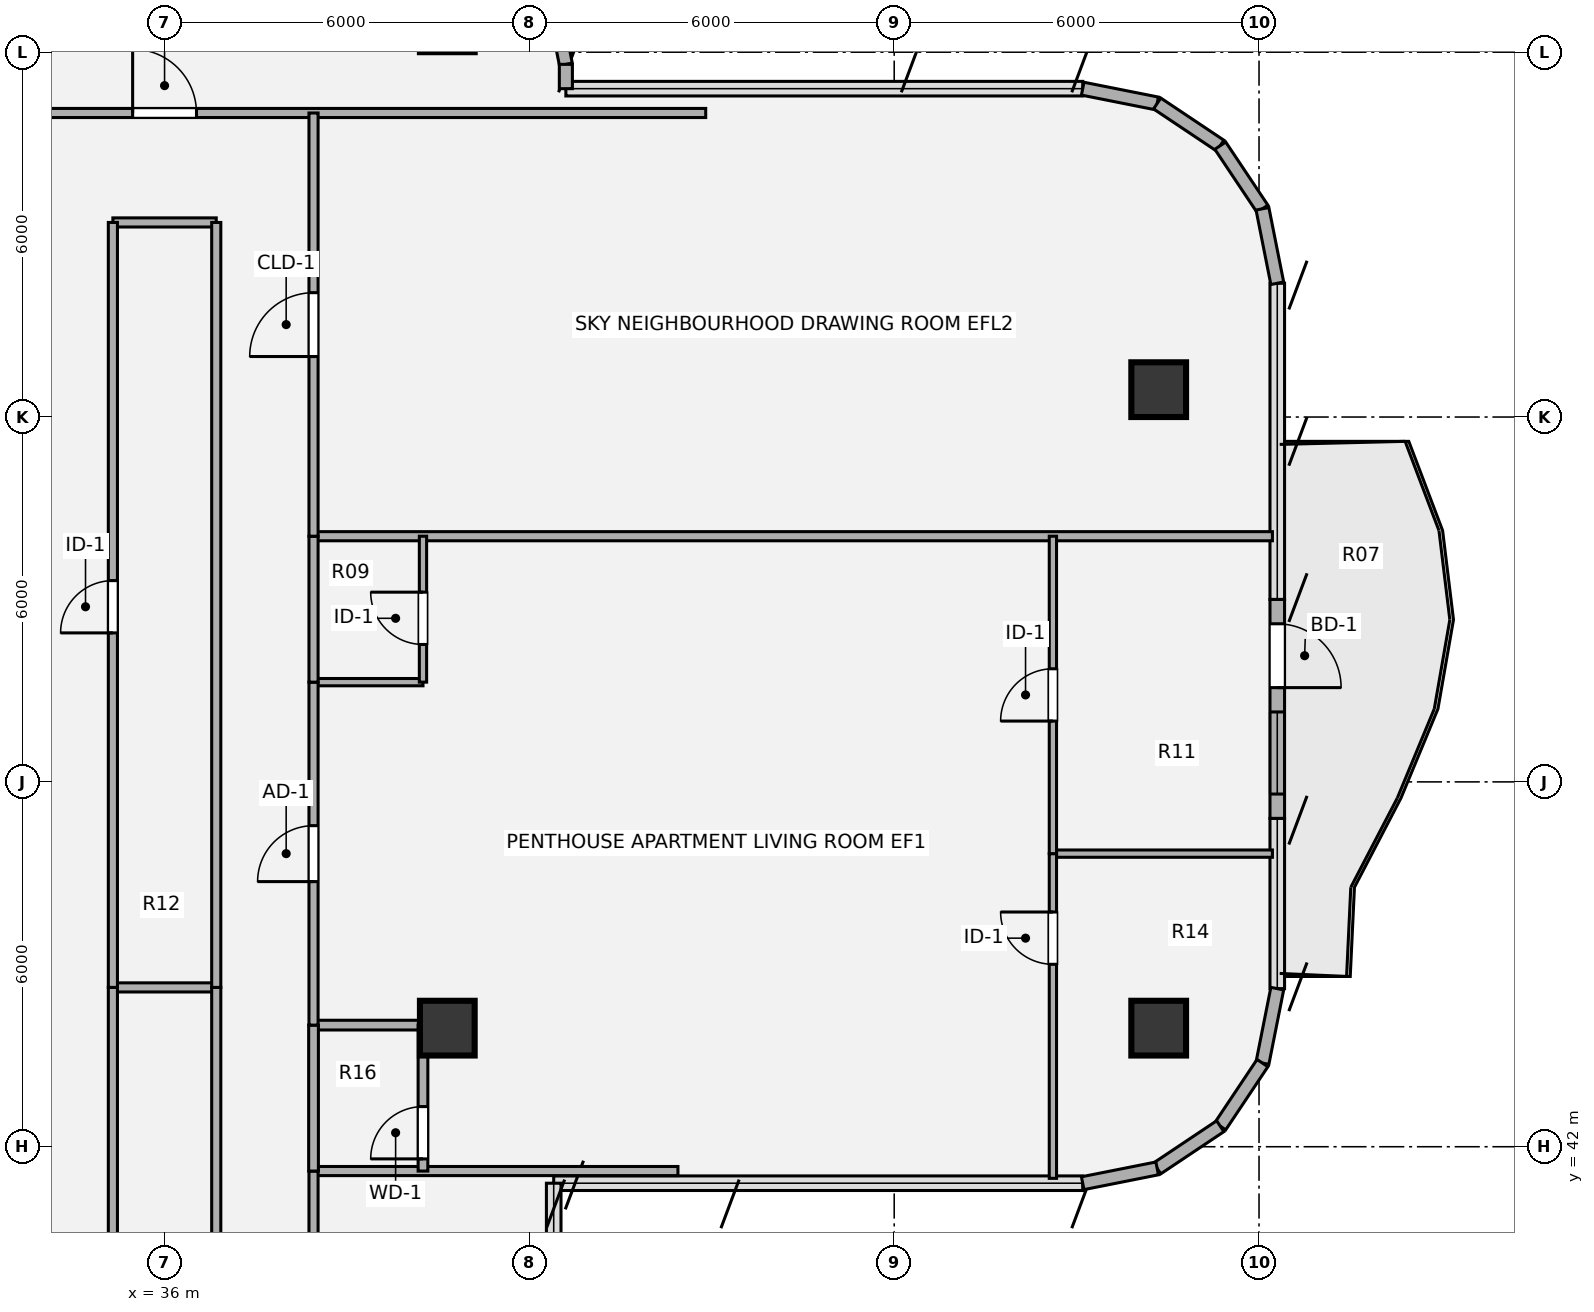
"""IFC4 building model, lengths in metres.
Left out: names, types, materials, properties, quantities, classifications, styles, units other than length and angle.
Written with IfcOpenShell. Run it as: python <this file> out.ifc"""

import sys

from ifc_helpers import new_model, si_unit, direction, frame, frame_2d, origin, origin_2d, place, context, subcontext, project, spatial, rectangle, hollow_circle, extrude, source, transform, mapped, element, fill, save


model = new_model("IFC4")
c1 = context("Model", 3, precision=1e-05, world=origin(), true_north=direction((0.0, 1.0)))
c2 = subcontext(c1, "Body", "Model", "MODEL_VIEW")
j1 = project(units=[si_unit("LENGTHUNIT", "METRE"), si_unit("PLANEANGLEUNIT", "RADIAN")], contexts=[c1])
p1 = place(None, origin())
s1 = spatial("IfcSite", under=j1, at=p1, CompositionType="ELEMENT")
p2 = place(p1, origin())
s2 = spatial("IfcBuilding", under=s1, at=p2, CompositionType="ELEMENT")
p3 = place(p2, frame((0.0, 0.0, 275.94)))
s3 = spatial("IfcBuildingStorey", under=s2, at=p3, CompositionType="ELEMENT", Elevation=275.94)
m1 = source(origin(), c2, "Body", "SweptSolid", [
    extrude(hollow_circle(Radius=0.45, WallThickness=0.032, at=origin_2d()), origin(), (0.0, 0.0, 1.0), 3.78),
])
for number, where, z_axis, x_axis in (
    (1, (52.35, 43.95, 0.0), (0.0, 0.0, 1.0), (1.0, 0.0, 0.0)),
    (2, (52.35, 54.45, 0.0), (0.0, 0.0, 1.0), (1.0, 0.0, 0.0)),
    (3, (40.65, 43.95, 0.0), (0.0, 0.0, 1.0), (1.0, 0.0, 0.0)),
):
    element("IfcColumn", number, at=place(p3, frame(where, z_axis=z_axis, x_axis=x_axis)), inside=s3, PredefinedType="COLUMN", context=c2, shape_type="MappedRepresentation", body=[
        mapped(m1, transform((0.0, 0.0, 0.0), x_axis=(1.0, 0.0, 0.0), y_axis=(0.0, 1.0, 0.0), z_axis=(0.0, 0.0, 1.0), scale=1.0)),
    ])
p4 = place(p3, frame((42.402, 60.795, 0.0), z_axis=(0.0, 0.0, 1.0), x_axis=(0.195190360752, -0.980765376158, 0.0)))
e4 = element("IfcWall", 4, at=p4, inside=s3, PredefinedType="SOLIDWALL", context=c2, shape_type="SweptSolid", body=[
    extrude(rectangle(XDim=1.014, YDim=0.215, at=frame_2d((0.507, 0.0))), origin(), (0.0, 0.0, 1.0), 3.53),
])
p5 = place(p3, frame((42.6, 59.8, 0.0), z_axis=(0.0, 0.0, 1.0), x_axis=(0.0, -1.0, 0.0)))
e5 = element("IfcWall", 5, at=p5, inside=s3, PredefinedType="SOLIDWALL", context=c2, shape_type="SweptSolid", body=[
    extrude(rectangle(XDim=0.4, YDim=0.215, at=frame_2d((0.2, 0.0))), origin(), (0.0, 0.0, 1.0), 3.53),
])
for number, where, z_axis, x_axis in (
    (6, (51.1, 59.4, 0.0), (0.0, 0.0, 1.0), (0.981, -0.195, 0.0)),
    (7, (52.325, 59.156, 0.0), (0.0, 0.0, 1.0), (0.831, -0.556, 0.0)),
    (8, (53.363, 58.463, 0.0), (0.0, 0.0, 1.0), (0.556, -0.831, 0.0)),
    (9, (54.056, 57.425, 0.0), (0.0, 0.0, 1.0), (0.195, -0.981, 0.0)),
):
    element("IfcWall", number, at=place(p3, frame(where, z_axis=z_axis, x_axis=x_axis)), inside=s3, PredefinedType="SOLIDWALL", context=c2, shape_type="SweptSolid", body=[
        extrude(rectangle(XDim=1.249, YDim=0.215, at=frame_2d((0.624, 0.0))), origin(), (0.0, 0.0, 1.0), 3.53),
    ])
p6 = place(p3, frame((54.3, 51.0, 0.0), z_axis=(0.0, 0.0, 1.0), x_axis=(0.0, -1.0, 0.0)))
e10 = element("IfcWall", 10, at=p6, inside=s3, PredefinedType="SOLIDWALL", context=c2, shape_type="SweptSolid", body=[
    extrude(rectangle(XDim=3.6, YDim=0.24, at=frame_2d((1.8, 0.0))), origin(), (0.0, 0.0, 1.0), 3.53),
])
p7 = place(p6, frame((0.4, 0.0, 0.0)))
e11 = element("IfcOpeningElement", 11, at=p7, cuts=e10, PredefinedType="OPENING", context=c2, shape_type="SweptSolid", body=[
    extrude(rectangle(XDim=1.05, YDim=2.15, at=origin_2d()), frame((0.525, 0.13, 1.075), z_axis=(0.0, -1.0, 0.0), x_axis=(1.0, 0.0, 0.0)), (0.0, 0.0, 1.0), 0.26),
])
p8 = place(p6, frame((1.85, 0.0, 0.85)))
e12 = element("IfcOpeningElement", 12, at=p8, cuts=e10, PredefinedType="OPENING", context=c2, shape_type="SweptSolid", body=[
    extrude(rectangle(XDim=1.35, YDim=1.35, at=origin_2d()), frame((0.675, 0.13, 0.675), z_axis=(0.0, -1.0, 0.0), x_axis=(1.0, 0.0, 0.0)), (0.0, 0.0, 1.0), 0.26),
])
for number, where, z_axis, x_axis in (
    (13, (54.3, 44.6, 0.0), (0.0, 0.0, 1.0), (-0.195, -0.981, 0.0)),
    (14, (54.056, 43.375, 0.0), (0.0, 0.0, 1.0), (-0.556, -0.831, 0.0)),
    (15, (53.363, 42.337, 0.0), (0.0, 0.0, 1.0), (-0.831, -0.556, 0.0)),
    (16, (52.325, 41.644, 0.0), (0.0, 0.0, 1.0), (-0.981, -0.195, 0.0)),
):
    element("IfcWall", number, at=place(p3, frame(where, z_axis=z_axis, x_axis=x_axis)), inside=s3, PredefinedType="SOLIDWALL", context=c2, shape_type="SweptSolid", body=[
        extrude(rectangle(XDim=1.249, YDim=0.215, at=frame_2d((0.624, 0.0))), origin(), (0.0, 0.0, 1.0), 3.53),
    ])
p9 = place(p3, frame((38.45, 41.6, 0.0), z_axis=(0.0, 0.0, 1.0), x_axis=(1.0, 0.0, 0.0)))
e17 = element("IfcWall", 17, at=p9, inside=s3, PredefinedType="PARTITIONING", context=c2, shape_type="SweptSolid", body=[
    extrude(rectangle(XDim=5.993, YDim=0.15, at=frame_2d((2.997, 0.0))), origin(), (0.0, 0.0, 1.0), 3.5),
])
p10 = place(p3, frame((38.45, 44.0, 0.0), z_axis=(0.0, 0.0, 1.0), x_axis=(1.0, 0.0, 0.0)))
e18 = element("IfcWall", 18, at=p10, inside=s3, PredefinedType="PLUMBINGWALL", context=c2, shape_type="SweptSolid", body=[
    extrude(rectangle(XDim=1.8, YDim=0.16, at=frame_2d((0.9, 0.0))), origin(), (0.0, 0.0, 1.0), 2.903),
])
p11 = place(p3, frame((35.15, 44.62, 0.0), z_axis=(0.0, 0.0, 1.0), x_axis=(1.0, 0.0, 0.0)))
e19 = element("IfcWall", 19, at=p11, inside=s3, PredefinedType="PARTITIONING", context=c2, shape_type="SweptSolid", body=[
    extrude(rectangle(XDim=1.7, YDim=0.15, at=frame_2d((0.85, 0.0))), origin(), (0.0, 0.0, 1.0), 3.259),
])
p12 = place(p3, frame((50.61, 46.82, 0.0), z_axis=(0.0, 0.0, 1.0), x_axis=(1.0, 0.0, 0.0)))
e20 = element("IfcWall", 20, at=p12, inside=s3, PredefinedType="PARTITIONING", context=c2, shape_type="SweptSolid", body=[
    extrude(rectangle(XDim=3.61, YDim=0.12, at=frame_2d((1.805, 0.0))), origin(), (0.0, 0.0, 1.0), 2.982),
])
p13 = place(p3, frame((38.45, 49.64, 0.0), z_axis=(0.0, 0.0, 1.0), x_axis=(1.0, 0.0, 0.0)))
e21 = element("IfcWall", 21, at=p13, inside=s3, PredefinedType="PARTITIONING", context=c2, shape_type="SweptSolid", body=[
    extrude(rectangle(XDim=1.8, YDim=0.12, at=frame_2d((0.9, 0.0))), origin(), (0.0, 0.0, 1.0), 3.259),
])
p14 = place(p3, frame((38.45, 52.04, 0.0), z_axis=(0.0, 0.0, 1.0), x_axis=(1.0, 0.0, 0.0)))
e22 = element("IfcWall", 22, at=p14, inside=s3, PredefinedType="PARTITIONING", context=c2, shape_type="SweptSolid", body=[
    extrude(rectangle(XDim=15.77, YDim=0.15, at=frame_2d((7.885, 0.0))), origin(), (0.0, 0.0, 1.0), 2.982),
])
p15 = place(p3, frame((35.15, 57.2, 0.0), z_axis=(0.0, 0.0, 1.0), x_axis=(1.0, 0.0, 0.0)))
e23 = element("IfcWall", 23, at=p15, inside=s3, PredefinedType="PARTITIONING", context=c2, shape_type="SweptSolid", body=[
    extrude(rectangle(XDim=1.7, YDim=0.15, at=frame_2d((0.85, 0.0))), origin(), (0.0, 0.0, 1.0), 3.308),
])
p16 = place(p3, frame((27.1, 59.0, 0.0), z_axis=(0.0, 0.0, 1.0), x_axis=(1.0, 0.0, 0.0)))
e24 = element("IfcWall", 24, at=p16, inside=s3, PredefinedType="PARTITIONING", context=c2, shape_type="SweptSolid", body=[
    extrude(rectangle(XDim=17.8, YDim=0.15, at=frame_2d((8.9, 0.0))), origin(), (0.0, 0.0, 1.0), 3.308),
])
p17 = place(p16, frame((8.375, 0.0, 0.0)))
e25 = element("IfcOpeningElement", 25, at=p17, cuts=e24, PredefinedType="OPENING", context=c2, shape_type="SweptSolid", body=[
    extrude(rectangle(XDim=1.05, YDim=2.1, at=origin_2d()), frame((0.525, 0.085, 1.05), z_axis=(0.0, -1.0, 0.0), x_axis=(1.0, 0.0, 0.0)), (0.0, 0.0, 1.0), 0.17),
])
p18 = place(p3, frame((35.15, 25.2, 0.0), z_axis=(0.0, 0.0, 1.0), x_axis=(0.0, 1.0, 0.0)))
e26 = element("IfcWall", 26, at=p18, inside=s3, PredefinedType="PARTITIONING", context=c2, shape_type="SweptSolid", body=[
    extrude(rectangle(XDim=19.42, YDim=0.15, at=frame_2d((9.71, 0.0))), origin(), (0.0, 0.0, 1.0), 3.5),
])
p19 = place(p3, frame((35.15, 44.62, 0.0), z_axis=(0.0, 0.0, 1.0), x_axis=(0.0, 1.0, 0.0)))
e27 = element("IfcWall", 27, at=p19, inside=s3, PredefinedType="PARTITIONING", context=c2, shape_type="SweptSolid", body=[
    extrude(rectangle(XDim=12.58, YDim=0.15, at=frame_2d((6.29, 0.0))), origin(), (0.0, 0.0, 1.0), 3.5),
])
p20 = place(p19, frame((5.83, 0.0, 0.0)))
e28 = element("IfcOpeningElement", 28, at=p20, cuts=e27, PredefinedType="OPENING", context=c2, shape_type="SweptSolid", body=[
    extrude(rectangle(XDim=0.86, YDim=2.1, at=origin_2d()), frame((0.43, 0.085, 1.05), z_axis=(0.0, -1.0, 0.0), x_axis=(1.0, 0.0, 0.0)), (0.0, 0.0, 1.0), 0.17),
])
p21 = place(p3, frame((36.85, 25.2, 0.0), z_axis=(0.0, 0.0, 1.0), x_axis=(0.0, 1.0, 0.0)))
e29 = element("IfcWall", 29, at=p21, inside=s3, PredefinedType="PARTITIONING", context=c2, shape_type="SweptSolid", body=[
    extrude(rectangle(XDim=19.42, YDim=0.15, at=frame_2d((9.71, 0.0))), origin(), (0.0, 0.0, 1.0), 3.5),
])
p22 = place(p21, frame((9.185, 0.0, 0.0)))
e30 = element("IfcOpeningElement", 30, at=p22, cuts=e29, PredefinedType="OPENING", context=c2, shape_type="SweptSolid", body=[
    extrude(rectangle(XDim=1.05, YDim=2.1, at=origin_2d()), frame((0.525, 0.085, 1.05), z_axis=(0.0, -1.0, 0.0), x_axis=(1.0, 0.0, 0.0)), (0.0, 0.0, 1.0), 0.17),
])
p23 = place(p3, frame((36.85, 44.62, 0.0), z_axis=(0.0, 0.0, 1.0), x_axis=(0.0, 1.0, 0.0)))
e31 = element("IfcWall", 31, at=p23, inside=s3, PredefinedType="PARTITIONING", context=c2, shape_type="SweptSolid", body=[
    extrude(rectangle(XDim=12.58, YDim=0.15, at=frame_2d((6.29, 0.0))), origin(), (0.0, 0.0, 1.0), 3.5),
])
p24 = place(p3, frame((38.45, 21.2, 0.0), z_axis=(0.0, 0.0, 1.0), x_axis=(0.0, 1.0, 0.0)))
e32 = element("IfcWall", 32, at=p24, inside=s3, PredefinedType="PARTITIONING", context=c2, shape_type="SweptSolid", body=[
    extrude(rectangle(XDim=20.4, YDim=0.15, at=frame_2d((10.2, 0.0))), origin(), (0.0, 0.0, 1.0), 3.5),
])
p25 = place(p24, frame((9.575, 0.0, 0.0)))
e33 = element("IfcOpeningElement", 33, at=p25, cuts=e32, PredefinedType="OPENING", context=c2, shape_type="SweptSolid", body=[
    extrude(rectangle(XDim=1.05, YDim=2.1, at=origin_2d()), frame((0.525, 0.085, 1.05), z_axis=(0.0, -1.0, 0.0), x_axis=(1.0, 0.0, 0.0)), (0.0, 0.0, 1.0), 0.17),
])
p26 = place(p3, frame((38.45, 41.6, 0.0), z_axis=(0.0, 0.0, 1.0), x_axis=(0.0, 1.0, 0.0)))
e34 = element("IfcWall", 34, at=p26, inside=s3, PredefinedType="PLUMBINGWALL", context=c2, shape_type="SweptSolid", body=[
    extrude(rectangle(XDim=2.4, YDim=0.16, at=frame_2d((1.2, 0.0))), origin(), (0.0, 0.0, 1.0), 3.5),
])
p27 = place(p3, frame((38.45, 44.0, 0.0), z_axis=(0.0, 0.0, 1.0), x_axis=(0.0, 1.0, 0.0)))
e35 = element("IfcWall", 35, at=p27, inside=s3, PredefinedType="PARTITIONING", context=c2, shape_type="SweptSolid", body=[
    extrude(rectangle(XDim=5.64, YDim=0.15, at=frame_2d((2.82, 0.0))), origin(), (0.0, 0.0, 1.0), 3.5),
])
p28 = place(p27, frame((2.36, 0.0, 0.0)))
e36 = element("IfcOpeningElement", 36, at=p28, cuts=e35, PredefinedType="OPENING", context=c2, shape_type="SweptSolid", body=[
    extrude(rectangle(XDim=0.92, YDim=2.1, at=origin_2d()), frame((0.46, 0.085, 1.05), z_axis=(0.0, -1.0, 0.0), x_axis=(1.0, 0.0, 0.0)), (0.0, 0.0, 1.0), 0.17),
])
p29 = place(p3, frame((38.45, 49.64, 0.0), z_axis=(0.0, 0.0, 1.0), x_axis=(0.0, 1.0, 0.0)))
e37 = element("IfcWall", 37, at=p29, inside=s3, PredefinedType="PARTITIONING", context=c2, shape_type="SweptSolid", body=[
    extrude(rectangle(XDim=2.4, YDim=0.15, at=frame_2d((1.2, 0.0))), origin(), (0.0, 0.0, 1.0), 3.5),
])
p30 = place(p3, frame((38.45, 52.04, 0.0), z_axis=(0.0, 0.0, 1.0), x_axis=(0.0, 1.0, 0.0)))
e38 = element("IfcWall", 38, at=p30, inside=s3, PredefinedType="PARTITIONING", context=c2, shape_type="SweptSolid", body=[
    extrude(rectangle(XDim=6.96, YDim=0.15, at=frame_2d((3.48, 0.0))), origin(), (0.0, 0.0, 1.0), 3.5),
])
p31 = place(p30, frame((2.955, 0.0, 0.0)))
e39 = element("IfcOpeningElement", 39, at=p31, cuts=e38, PredefinedType="OPENING", context=c2, shape_type="SweptSolid", body=[
    extrude(rectangle(XDim=1.05, YDim=2.1, at=origin_2d()), frame((0.525, 0.085, 1.05), z_axis=(0.0, -1.0, 0.0), x_axis=(1.0, 0.0, 0.0)), (0.0, 0.0, 1.0), 0.17),
])
p32 = place(p3, frame((40.25, 41.6, 0.0), z_axis=(0.0, 0.0, 1.0), x_axis=(0.0, 1.0, 0.0)))
e40 = element("IfcWall", 40, at=p32, inside=s3, PredefinedType="PLUMBINGWALL", context=c2, shape_type="SweptSolid", body=[
    extrude(rectangle(XDim=2.4, YDim=0.16, at=frame_2d((1.2, 0.0))), origin(), (0.0, 0.0, 1.0), 3.5),
])
p33 = place(p32, frame((0.2, 0.0, 0.0)))
e41 = element("IfcOpeningElement", 41, at=p33, cuts=e40, PredefinedType="OPENING", context=c2, shape_type="SweptSolid", body=[
    extrude(rectangle(XDim=0.86, YDim=2.1, at=origin_2d()), frame((0.43, 0.09, 1.05), z_axis=(0.0, -1.0, 0.0), x_axis=(1.0, 0.0, 0.0)), (0.0, 0.0, 1.0), 0.18),
])
p34 = place(p3, frame((40.25, 49.64, 0.0), z_axis=(0.0, 0.0, 1.0), x_axis=(0.0, 1.0, 0.0)))
e42 = element("IfcWall", 42, at=p34, inside=s3, PredefinedType="PARTITIONING", context=c2, shape_type="SweptSolid", body=[
    extrude(rectangle(XDim=2.4, YDim=0.12, at=frame_2d((1.2, 0.0))), origin(), (0.0, 0.0, 1.0), 3.5),
])
p35 = place(p34, frame((0.62, 0.0, 0.0)))
e43 = element("IfcOpeningElement", 43, at=p35, cuts=e42, PredefinedType="OPENING", context=c2, shape_type="SweptSolid", body=[
    extrude(rectangle(XDim=0.86, YDim=2.1, at=origin_2d()), frame((0.43, 0.07, 1.05), z_axis=(0.0, -1.0, 0.0), x_axis=(1.0, 0.0, 0.0)), (0.0, 0.0, 1.0), 0.14),
])
p36 = place(p3, frame((50.61, 41.48, 0.0), z_axis=(0.0, 0.0, 1.0), x_axis=(0.0, 1.0, 0.0)))
e44 = element("IfcWall", 44, at=p36, inside=s3, PredefinedType="PARTITIONING", context=c2, shape_type="SweptSolid", body=[
    extrude(rectangle(XDim=5.34, YDim=0.12, at=frame_2d((2.67, 0.0))), origin(), (0.0, 0.0, 1.0), 3.5),
])
p37 = place(p36, frame((3.52, 0.0, 0.0)))
e45 = element("IfcOpeningElement", 45, at=p37, cuts=e44, PredefinedType="OPENING", context=c2, shape_type="SweptSolid", body=[
    extrude(rectangle(XDim=0.86, YDim=2.1, at=origin_2d()), frame((0.43, 0.07, 1.05), z_axis=(0.0, -1.0, 0.0), x_axis=(1.0, 0.0, 0.0)), (0.0, 0.0, 1.0), 0.14),
])
p38 = place(p3, frame((50.61, 46.82, 0.0), z_axis=(0.0, 0.0, 1.0), x_axis=(0.0, 1.0, 0.0)))
e46 = element("IfcWall", 46, at=p38, inside=s3, PredefinedType="PARTITIONING", context=c2, shape_type="SweptSolid", body=[
    extrude(rectangle(XDim=5.22, YDim=0.12, at=frame_2d((2.61, 0.0))), origin(), (0.0, 0.0, 1.0), 3.5),
])
p39 = place(p38, frame((2.18, 0.0, 0.0)))
e47 = element("IfcOpeningElement", 47, at=p39, cuts=e46, PredefinedType="OPENING", context=c2, shape_type="SweptSolid", body=[
    extrude(rectangle(XDim=0.86, YDim=2.1, at=origin_2d()), frame((0.43, 0.07, 1.05), z_axis=(0.0, -1.0, 0.0), x_axis=(1.0, 0.0, 0.0)), (0.0, 0.0, 1.0), 0.14),
])
m2 = source(origin(), c2, "Body", "SweptSolid", [
    extrude(rectangle(XDim=1.05, YDim=2.15, at=origin_2d()), frame((0.525, 0.025, 1.075), z_axis=(0.0, -1.0, 0.0), x_axis=(1.0, 0.0, 0.0)), (0.0, 0.0, 1.0), 0.05),
])
p40 = place(p7, origin())
e48 = element("IfcDoor", 48, at=p40, inside=s3, OperationType="SINGLE_SWING_RIGHT", PredefinedType="DOOR", context=c2, shape_type="MappedRepresentation", body=[
    mapped(m2, transform((0.0, 0.0, 0.0), x_axis=(1.0, 0.0, 0.0), y_axis=(0.0, 1.0, 0.0), z_axis=(0.0, 0.0, 1.0), scale=1.0)),
])
fill(e11, e48)
m3 = source(origin(), c2, "Body", "SweptSolid", [
    extrude(rectangle(XDim=1.35, YDim=1.35, at=origin_2d()), frame((0.675, 0.03, 0.675), z_axis=(0.0, -1.0, 0.0), x_axis=(1.0, 0.0, 0.0)), (0.0, 0.0, 1.0), 0.06),
])
p41 = place(p8, origin())
e49 = element("IfcWindow", 49, at=p41, inside=s3, PartitioningType="SINGLE_PANEL", PredefinedType="WINDOW", context=c2, shape_type="MappedRepresentation", body=[
    mapped(m3, transform((0.0, 0.0, 0.0), x_axis=(1.0, 0.0, 0.0), y_axis=(0.0, 1.0, 0.0), z_axis=(0.0, 0.0, 1.0), scale=1.0)),
])
fill(e12, e49)
m4 = source(origin(), c2, "Body", "SweptSolid", [
    extrude(rectangle(XDim=1.05, YDim=2.1, at=origin_2d()), frame((0.525, 0.025, 1.05), z_axis=(0.0, -1.0, 0.0), x_axis=(1.0, 0.0, 0.0)), (0.0, 0.0, 1.0), 0.05),
])
p42 = place(p17, origin())
e50 = element("IfcDoor", 50, at=p42, inside=s3, OperationType="SINGLE_SWING_LEFT", PredefinedType="DOOR", context=c2, shape_type="MappedRepresentation", body=[
    mapped(m4, transform((0.0, 0.0, 0.0), x_axis=(1.0, 0.0, 0.0), y_axis=(0.0, 1.0, 0.0), z_axis=(0.0, 0.0, 1.0), scale=1.0)),
])
fill(e25, e50)
m5 = source(origin(), c2, "Body", "SweptSolid", [
    extrude(rectangle(XDim=0.86, YDim=2.1, at=origin_2d()), frame((0.43, 0.025, 1.05), z_axis=(0.0, -1.0, 0.0), x_axis=(1.0, 0.0, 0.0)), (0.0, 0.0, 1.0), 0.05),
])
p43 = place(p20, origin())
e51 = element("IfcDoor", 51, at=p43, inside=s3, OperationType="SINGLE_SWING_LEFT", PredefinedType="DOOR", context=c2, shape_type="MappedRepresentation", body=[
    mapped(m5, transform((0.0, 0.0, 0.0), x_axis=(1.0, 0.0, 0.0), y_axis=(0.0, 1.0, 0.0), z_axis=(0.0, 0.0, 1.0), scale=1.0)),
])
fill(e28, e51)
m6 = source(origin(), c2, "Body", "SweptSolid", [
    extrude(rectangle(XDim=0.92, YDim=2.1, at=origin_2d()), frame((0.46, 0.025, 1.05), z_axis=(0.0, -1.0, 0.0), x_axis=(1.0, 0.0, 0.0)), (0.0, 0.0, 1.0), 0.05),
])
p44 = place(p28, origin())
e52 = element("IfcDoor", 52, at=p44, inside=s3, OperationType="SINGLE_SWING_LEFT", PredefinedType="DOOR", context=c2, shape_type="MappedRepresentation", body=[
    mapped(m6, transform((0.0, 0.0, 0.0), x_axis=(1.0, 0.0, 0.0), y_axis=(0.0, 1.0, 0.0), z_axis=(0.0, 0.0, 1.0), scale=1.0)),
])
fill(e36, e52)
p45 = place(p31, origin())
e53 = element("IfcDoor", 53, at=p45, inside=s3, OperationType="SINGLE_SWING_LEFT", PredefinedType="DOOR", context=c2, shape_type="MappedRepresentation", body=[
    mapped(m4, transform((0.0, 0.0, 0.0), x_axis=(1.0, 0.0, 0.0), y_axis=(0.0, 1.0, 0.0), z_axis=(0.0, 0.0, 1.0), scale=1.0)),
])
fill(e39, e53)
m7 = source(origin(), c2, "Body", "SweptSolid", [
    extrude(rectangle(XDim=0.86, YDim=2.1, at=origin_2d()), frame((0.43, 0.025, 1.05), z_axis=(0.0, -1.0, 0.0), x_axis=(1.0, 0.0, 0.0)), (0.0, 0.0, 1.0), 0.05),
])
p46 = place(p33, origin())
e54 = element("IfcDoor", 54, at=p46, inside=s3, OperationType="SINGLE_SWING_LEFT", PredefinedType="DOOR", context=c2, shape_type="MappedRepresentation", body=[
    mapped(m7, transform((0.0, 0.0, 0.0), x_axis=(1.0, 0.0, 0.0), y_axis=(0.0, 1.0, 0.0), z_axis=(0.0, 0.0, 1.0), scale=1.0)),
])
fill(e41, e54)
p47 = place(p35, origin())
e55 = element("IfcDoor", 55, at=p47, inside=s3, OperationType="SINGLE_SWING_RIGHT", PredefinedType="DOOR", context=c2, shape_type="MappedRepresentation", body=[
    mapped(m5, transform((0.0, 0.0, 0.0), x_axis=(1.0, 0.0, 0.0), y_axis=(0.0, 1.0, 0.0), z_axis=(0.0, 0.0, 1.0), scale=1.0)),
])
fill(e43, e55)
p48 = place(p37, origin())
e56 = element("IfcDoor", 56, at=p48, inside=s3, OperationType="SINGLE_SWING_RIGHT", PredefinedType="DOOR", context=c2, shape_type="MappedRepresentation", body=[
    mapped(m5, transform((0.0, 0.0, 0.0), x_axis=(1.0, 0.0, 0.0), y_axis=(0.0, 1.0, 0.0), z_axis=(0.0, 0.0, 1.0), scale=1.0)),
])
fill(e45, e56)
p49 = place(p39, origin())
e57 = element("IfcDoor", 57, at=p49, inside=s3, OperationType="SINGLE_SWING_LEFT", PredefinedType="DOOR", context=c2, shape_type="MappedRepresentation", body=[
    mapped(m5, transform((0.0, 0.0, 0.0), x_axis=(1.0, 0.0, 0.0), y_axis=(0.0, 1.0, 0.0), z_axis=(0.0, 0.0, 1.0), scale=1.0)),
])
fill(e47, e57)
save(model, sys.argv[1])
